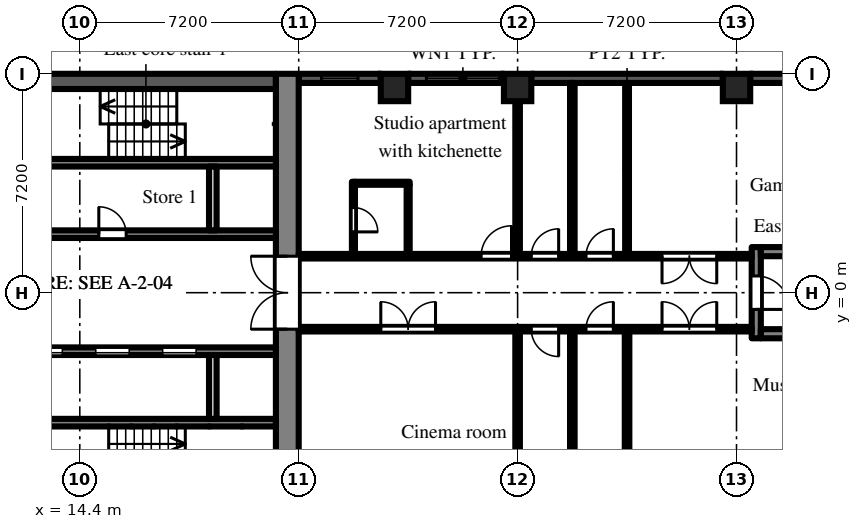
"""IFC4 building model, lengths in metres.
Left out: names, types, materials, properties, quantities, classifications, styles, units other than length and angle.
Written with IfcOpenShell. Run it as: python <this file> out.ifc"""

import sys

from ifc_helpers import new_model, si_unit, direction, frame, frame_2d, origin, origin_2d, place, context, subcontext, project, spatial, rectangle, extrude, element, fill, save


model = new_model("IFC4")
c1 = context("Model", 3, precision=1e-05, world=origin(), true_north=direction((0.0, 1.0)))
c2 = subcontext(c1, "Body", "Model", "MODEL_VIEW")
j1 = project(units=[si_unit("LENGTHUNIT", "METRE"), si_unit("PLANEANGLEUNIT", "RADIAN")], contexts=[c1])
p1 = place(None, origin())
s1 = spatial("IfcSite", under=j1, at=p1, CompositionType="ELEMENT")
p2 = place(p1, origin())
s2 = spatial("IfcBuilding", under=s1, at=p2, CompositionType="ELEMENT")
p3 = place(p2, frame((0.0, 0.0, 11.7)))
s3 = spatial("IfcBuildingStorey", under=s2, at=p3, CompositionType="ELEMENT", Elevation=11.7)
for number, where, z_axis, x_axis in (
    (1, (24.75, 6.75, 0.0), (0.0, 0.0, 1.0), (1.0, 0.0, 0.0)),
    (2, (28.8, 6.75, 0.0), (0.0, 0.0, 1.0), (1.0, 0.0, 0.0)),
    (3, (36.0, 6.75, 0.0), (0.0, 0.0, 1.0), (1.0, 0.0, 0.0)),
):
    element("IfcColumn", number, at=place(p3, frame(where, z_axis=z_axis, x_axis=x_axis)), inside=s3, PredefinedType="COLUMN", context=c2, shape_type="SweptSolid", body=[
        extrude(rectangle(XDim=0.9, YDim=0.9, at=origin_2d()), origin(), (0.0, 0.0, 1.0), 3.0),
    ])
p4 = place(p3, frame((38.7, 7.05, 0.0), z_axis=(0.0, 0.0, 1.0), x_axis=(-1.0, 0.0, 0.0)))
e4 = element("IfcWall", 4, at=p4, inside=s3, PredefinedType="SOLIDWALL", context=c2, shape_type="SweptSolid", body=[
    extrude(rectangle(XDim=2.25, YDim=0.3, at=frame_2d((1.125, 0.0))), origin(), (0.0, 0.0, 1.0), 2.1),
])
p5 = place(p3, frame((35.55, 7.05, 0.0), z_axis=(0.0, 0.0, 1.0), x_axis=(-1.0, 0.0, 0.0)))
e5 = element("IfcWall", 5, at=p5, inside=s3, PredefinedType="SOLIDWALL", context=c2, shape_type="SweptSolid", body=[
    extrude(rectangle(XDim=6.3, YDim=0.3, at=frame_2d((3.15, 0.0))), origin(), (0.0, 0.0, 1.0), 2.1),
])
p6 = place(p3, frame((28.35, 7.05, 0.0), z_axis=(0.0, 0.0, 1.0), x_axis=(-1.0, 0.0, 0.0)))
e6 = element("IfcWall", 6, at=p6, inside=s3, PredefinedType="SOLIDWALL", context=c2, shape_type="SweptSolid", body=[
    extrude(rectangle(XDim=3.15, YDim=0.3, at=frame_2d((1.575, 0.0))), origin(), (0.0, 0.0, 1.0), 2.1),
])
p7 = place(p6, frame((0.15, 0.0, 0.2)))
e7 = element("IfcOpeningElement", 7, at=p7, cuts=e6, PredefinedType="OPENING", context=c2, shape_type="SweptSolid", body=[
    extrude(rectangle(XDim=2.4, YDim=1.85, at=frame_2d((1.2, 0.925))), frame((0.0, 0.16, 0.0), z_axis=(0.0, -1.0, 0.0), x_axis=(1.0, 0.0, 0.0)), (0.0, 0.0, 1.0), 0.32),
])
p8 = place(p3, frame((24.3, 7.05, 0.0), z_axis=(0.0, 0.0, 1.0), x_axis=(-1.0, 0.0, 0.0)))
e8 = element("IfcWall", 8, at=p8, inside=s3, PredefinedType="SOLIDWALL", context=c2, shape_type="SweptSolid", body=[
    extrude(rectangle(XDim=2.7, YDim=0.3, at=frame_2d((1.35, 0.0))), origin(), (0.0, 0.0, 1.0), 2.1),
])
p9 = place(p8, frame((0.75, 0.0, 0.2)))
e9 = element("IfcOpeningElement", 9, at=p9, cuts=e8, PredefinedType="OPENING", context=c2, shape_type="SweptSolid", body=[
    extrude(rectangle(XDim=1.2, YDim=1.85, at=frame_2d((0.6, 0.925))), frame((0.0, 0.16, 0.0), z_axis=(0.0, -1.0, 0.0), x_axis=(1.0, 0.0, 0.0)), (0.0, 0.0, 1.0), 0.32),
])
p10 = place(p3, frame((21.225, -7.2, 0.0), z_axis=(0.0, 0.0, 1.0), x_axis=(0.0, 1.0, 0.0)))
e10 = element("IfcWall", 10, at=p10, inside=s3, PredefinedType="SHEAR", context=c2, shape_type="SweptSolid", body=[
    extrude(rectangle(XDim=14.4, YDim=0.75, at=frame_2d((7.2, 0.0))), origin(), (0.0, 0.0, 1.0), 2.575),
])
p11 = place(p10, frame((6.0, 0.0, 0.0)))
e11 = element("IfcOpeningElement", 11, at=p11, cuts=e10, PredefinedType="OPENING", context=c2, shape_type="SweptSolid", body=[
    extrude(rectangle(XDim=2.4, YDim=2.2, at=frame_2d((1.2, 1.1))), frame((0.0, 0.385, 0.0), z_axis=(0.0, -1.0, 0.0), x_axis=(1.0, 0.0, 0.0)), (0.0, 0.0, 1.0), 0.77),
])
p12 = place(p3, frame((7.9, 6.95, 0.0), z_axis=(0.0, 0.0, 1.0), x_axis=(1.0, 0.0, 0.0)))
e12 = element("IfcWall", 12, at=p12, inside=s3, PredefinedType="SHEAR", context=c2, shape_type="SweptSolid", body=[
    extrude(rectangle(XDim=12.95, YDim=0.5, at=frame_2d((6.475, 0.0))), origin(), (0.0, 0.0, 1.0), 2.575),
])
p13 = place(p3, frame((7.9, 1.925, 0.0), z_axis=(0.0, 0.0, 1.0), x_axis=(1.0, 0.0, 0.0)))
e13 = element("IfcWall", 13, at=p13, inside=s3, PredefinedType="SHEAR", context=c2, shape_type="SweptSolid", body=[
    extrude(rectangle(XDim=12.95, YDim=0.25, at=frame_2d((6.475, 0.0))), origin(), (0.0, 0.0, 1.0), 2.575),
])
p14 = place(p13, frame((0.525, 0.0, 0.0)))
e14 = element("IfcOpeningElement", 14, at=p14, cuts=e13, PredefinedType="OPENING", context=c2, shape_type="SweptSolid", body=[
    extrude(rectangle(XDim=0.9, YDim=2.1, at=frame_2d((0.45, 1.05))), frame((0.0, 0.135, 0.0), z_axis=(0.0, -1.0, 0.0), x_axis=(1.0, 0.0, 0.0)), (0.0, 0.0, 1.0), 0.27),
])
p15 = place(p13, frame((2.625, 0.0, 0.0)))
e15 = element("IfcOpeningElement", 15, at=p15, cuts=e13, PredefinedType="OPENING", context=c2, shape_type="SweptSolid", body=[
    extrude(rectangle(XDim=1.1, YDim=2.1, at=frame_2d((0.55, 1.05))), frame((0.0, 0.135, 0.0), z_axis=(0.0, -1.0, 0.0), x_axis=(1.0, 0.0, 0.0)), (0.0, 0.0, 1.0), 0.27),
])
p16 = place(p13, frame((7.125, 0.0, 0.0)))
e16 = element("IfcOpeningElement", 16, at=p16, cuts=e13, PredefinedType="OPENING", context=c2, shape_type="SweptSolid", body=[
    extrude(rectangle(XDim=0.9, YDim=2.1, at=frame_2d((0.45, 1.05))), frame((0.0, 0.135, 0.0), z_axis=(0.0, -1.0, 0.0), x_axis=(1.0, 0.0, 0.0)), (0.0, 0.0, 1.0), 0.27),
])
p17 = place(p3, frame((12.3, 4.275, 0.0), z_axis=(0.0, 0.0, 1.0), x_axis=(1.0, 0.0, 0.0)))
e17 = element("IfcWall", 17, at=p17, inside=s3, PredefinedType="SHEAR", context=c2, shape_type="SweptSolid", body=[
    extrude(rectangle(XDim=8.55, YDim=0.25, at=frame_2d((4.275, 0.0))), origin(), (0.0, 0.0, 1.0), 2.575),
])
p18 = place(p3, frame((18.775, 2.05, 0.0), z_axis=(0.0, 0.0, 1.0), x_axis=(0.0, 1.0, 0.0)))
e18 = element("IfcWall", 18, at=p18, inside=s3, PredefinedType="PARTITIONING", context=c2, shape_type="SweptSolid", body=[
    extrude(rectangle(XDim=2.1, YDim=0.25, at=frame_2d((1.05, 0.0))), origin(), (0.0, 0.0, 1.0), 2.575),
])
p19 = place(p3, frame((7.9, -1.925, 0.0), z_axis=(0.0, 0.0, 1.0), x_axis=(1.0, 0.0, 0.0)))
e19 = element("IfcWall", 19, at=p19, inside=s3, PredefinedType="SHEAR", context=c2, shape_type="SweptSolid", body=[
    extrude(rectangle(XDim=12.95, YDim=0.25, at=frame_2d((6.475, 0.0))), origin(), (0.0, 0.0, 1.0), 2.575),
])
p20 = place(p19, frame((4.825, 0.0, 0.0)))
e20 = element("IfcOpeningElement", 20, at=p20, cuts=e19, PredefinedType="OPENING", context=c2, shape_type="SweptSolid", body=[
    extrude(rectangle(XDim=1.1, YDim=2.1, at=frame_2d((0.55, 1.05))), frame((0.0, 0.135, 0.0), z_axis=(0.0, -1.0, 0.0), x_axis=(1.0, 0.0, 0.0)), (0.0, 0.0, 1.0), 0.27),
])
p21 = place(p19, frame((7.025, 0.0, 0.0)))
e21 = element("IfcOpeningElement", 21, at=p21, cuts=e19, PredefinedType="OPENING", context=c2, shape_type="SweptSolid", body=[
    extrude(rectangle(XDim=1.1, YDim=2.1, at=frame_2d((0.55, 1.05))), frame((0.0, 0.135, 0.0), z_axis=(0.0, -1.0, 0.0), x_axis=(1.0, 0.0, 0.0)), (0.0, 0.0, 1.0), 0.27),
])
p22 = place(p19, frame((9.225, 0.0, 0.0)))
e22 = element("IfcOpeningElement", 22, at=p22, cuts=e19, PredefinedType="OPENING", context=c2, shape_type="SweptSolid", body=[
    extrude(rectangle(XDim=1.1, YDim=2.1, at=frame_2d((0.55, 1.05))), frame((0.0, 0.135, 0.0), z_axis=(0.0, -1.0, 0.0), x_axis=(1.0, 0.0, 0.0)), (0.0, 0.0, 1.0), 0.27),
])
p23 = place(p19, frame((0.525, 0.0, 0.0)))
e23 = element("IfcOpeningElement", 23, at=p23, cuts=e19, PredefinedType="OPENING", context=c2, shape_type="SweptSolid", body=[
    extrude(rectangle(XDim=0.9, YDim=2.1, at=frame_2d((0.45, 1.05))), frame((0.0, 0.135, 0.0), z_axis=(0.0, -1.0, 0.0), x_axis=(1.0, 0.0, 0.0)), (0.0, 0.0, 1.0), 0.27),
])
p24 = place(p19, frame((2.625, 0.0, 0.0)))
e24 = element("IfcOpeningElement", 24, at=p24, cuts=e19, PredefinedType="OPENING", context=c2, shape_type="SweptSolid", body=[
    extrude(rectangle(XDim=1.1, YDim=2.1, at=frame_2d((0.55, 1.05))), frame((0.0, 0.135, 0.0), z_axis=(0.0, -1.0, 0.0), x_axis=(1.0, 0.0, 0.0)), (0.0, 0.0, 1.0), 0.27),
])
p25 = place(p3, frame((12.3, -4.275, 0.0), z_axis=(0.0, 0.0, 1.0), x_axis=(1.0, 0.0, 0.0)))
e25 = element("IfcWall", 25, at=p25, inside=s3, PredefinedType="SHEAR", context=c2, shape_type="SweptSolid", body=[
    extrude(rectangle(XDim=8.55, YDim=0.25, at=frame_2d((4.275, 0.0))), origin(), (0.0, 0.0, 1.0), 2.575),
])
p26 = place(p3, frame((18.775, -2.05, 0.0), z_axis=(0.0, 0.0, 1.0), x_axis=(0.0, -1.0, 0.0)))
e26 = element("IfcWall", 26, at=p26, inside=s3, PredefinedType="PARTITIONING", context=c2, shape_type="SweptSolid", body=[
    extrude(rectangle(XDim=2.1, YDim=0.25, at=frame_2d((1.05, 0.0))), origin(), (0.0, 0.0, 1.0), 2.575),
])
p27 = place(p3, frame((36.65, -1.5, 0.0), z_axis=(0.0, 0.0, 1.0), x_axis=(0.0, 1.0, 0.0)))
e27 = element("IfcWall", 27, at=p27, inside=s3, PredefinedType="SHEAR", context=c2, shape_type="SweptSolid", body=[
    extrude(rectangle(XDim=3.0, YDim=0.3, at=frame_2d((1.5, 0.0))), origin(), (0.0, 0.0, 1.0), 2.575),
])
p28 = place(p27, frame((0.95, 0.0, 0.0)))
e28 = element("IfcOpeningElement", 28, at=p28, cuts=e27, PredefinedType="OPENING", context=c2, shape_type="SweptSolid", body=[
    extrude(rectangle(XDim=1.1, YDim=2.1, at=frame_2d((0.55, 1.05))), frame((0.0, 0.16, 0.0), z_axis=(0.0, -1.0, 0.0), x_axis=(1.0, 0.0, 0.0)), (0.0, 0.0, 1.0), 0.32),
])
for number, where, z_axis, x_axis in (
    (29, (36.8, -1.35, 0.0), (0.0, 0.0, 1.0), (1.0, 0.0, 0.0)),
    (30, (36.8, 1.35, 0.0), (0.0, 0.0, 1.0), (1.0, 0.0, 0.0)),
):
    element("IfcWall", number, at=place(p3, frame(where, z_axis=z_axis, x_axis=x_axis)), inside=s3, PredefinedType="SHEAR", context=c2, shape_type="SweptSolid", body=[
        extrude(rectangle(XDim=5.8, YDim=0.3, at=frame_2d((2.9, 0.0))), origin(), (0.0, 0.0, 1.0), 2.575),
    ])
p29 = place(p3, frame((21.6, -1.2, 0.0), z_axis=(0.0, 0.0, 1.0), x_axis=(1.0, 0.0, 0.0)))
e31 = element("IfcWall", 31, at=p29, inside=s3, PredefinedType="PARTITIONING", context=c2, shape_type="SweptSolid", body=[
    extrude(rectangle(XDim=14.9, YDim=0.15, at=frame_2d((7.45, 0.0))), origin(), (0.0, 0.0, 1.0), 2.575),
])
p30 = place(p29, frame((2.7, 0.0, 0.0)))
e32 = element("IfcOpeningElement", 32, at=p30, cuts=e31, PredefinedType="OPENING", context=c2, shape_type="SweptSolid", body=[
    extrude(rectangle(XDim=1.8, YDim=2.1, at=frame_2d((0.9, 1.05))), frame((0.0, 0.085, 0.0), z_axis=(0.0, -1.0, 0.0), x_axis=(1.0, 0.0, 0.0)), (0.0, 0.0, 1.0), 0.17),
])
p31 = place(p29, frame((7.65, 0.0, 0.0)))
e33 = element("IfcOpeningElement", 33, at=p31, cuts=e31, PredefinedType="OPENING", context=c2, shape_type="SweptSolid", body=[
    extrude(rectangle(XDim=0.9, YDim=2.1, at=frame_2d((0.45, 1.05))), frame((0.0, 0.085, 0.0), z_axis=(0.0, -1.0, 0.0), x_axis=(1.0, 0.0, 0.0)), (0.0, 0.0, 1.0), 0.17),
])
p32 = place(p29, frame((9.45, 0.0, 0.0)))
e34 = element("IfcOpeningElement", 34, at=p32, cuts=e31, PredefinedType="OPENING", context=c2, shape_type="SweptSolid", body=[
    extrude(rectangle(XDim=0.9, YDim=2.1, at=frame_2d((0.45, 1.05))), frame((0.0, 0.085, 0.0), z_axis=(0.0, -1.0, 0.0), x_axis=(1.0, 0.0, 0.0)), (0.0, 0.0, 1.0), 0.17),
])
p33 = place(p29, frame((11.95, 0.0, 0.0)))
e35 = element("IfcOpeningElement", 35, at=p33, cuts=e31, PredefinedType="OPENING", context=c2, shape_type="SweptSolid", body=[
    extrude(rectangle(XDim=1.8, YDim=2.1, at=frame_2d((0.9, 1.05))), frame((0.0, 0.085, 0.0), z_axis=(0.0, -1.0, 0.0), x_axis=(1.0, 0.0, 0.0)), (0.0, 0.0, 1.0), 0.17),
])
p34 = place(p3, frame((21.6, 1.2, 0.0), z_axis=(0.0, 0.0, 1.0), x_axis=(1.0, 0.0, 0.0)))
e36 = element("IfcWall", 36, at=p34, inside=s3, PredefinedType="PARTITIONING", context=c2, shape_type="SweptSolid", body=[
    extrude(rectangle(XDim=14.9, YDim=0.15, at=frame_2d((7.45, 0.0))), origin(), (0.0, 0.0, 1.0), 2.575),
])
p35 = place(p34, frame((6.0, 0.0, 0.0)))
e37 = element("IfcOpeningElement", 37, at=p35, cuts=e36, PredefinedType="OPENING", context=c2, shape_type="SweptSolid", body=[
    extrude(rectangle(XDim=1.0, YDim=2.1, at=frame_2d((0.5, 1.05))), frame((0.0, 0.085, 0.0), z_axis=(0.0, -1.0, 0.0), x_axis=(1.0, 0.0, 0.0)), (0.0, 0.0, 1.0), 0.17),
])
p36 = place(p34, frame((7.65, 0.0, 0.0)))
e38 = element("IfcOpeningElement", 38, at=p36, cuts=e36, PredefinedType="OPENING", context=c2, shape_type="SweptSolid", body=[
    extrude(rectangle(XDim=0.9, YDim=2.1, at=frame_2d((0.45, 1.05))), frame((0.0, 0.085, 0.0), z_axis=(0.0, -1.0, 0.0), x_axis=(1.0, 0.0, 0.0)), (0.0, 0.0, 1.0), 0.17),
])
p37 = place(p34, frame((9.45, 0.0, 0.0)))
e39 = element("IfcOpeningElement", 39, at=p37, cuts=e36, PredefinedType="OPENING", context=c2, shape_type="SweptSolid", body=[
    extrude(rectangle(XDim=0.9, YDim=2.1, at=frame_2d((0.45, 1.05))), frame((0.0, 0.085, 0.0), z_axis=(0.0, -1.0, 0.0), x_axis=(1.0, 0.0, 0.0)), (0.0, 0.0, 1.0), 0.17),
])
p38 = place(p34, frame((11.95, 0.0, 0.0)))
e40 = element("IfcOpeningElement", 40, at=p38, cuts=e36, PredefinedType="OPENING", context=c2, shape_type="SweptSolid", body=[
    extrude(rectangle(XDim=1.8, YDim=2.1, at=frame_2d((0.9, 1.05))), frame((0.0, 0.085, 0.0), z_axis=(0.0, -1.0, 0.0), x_axis=(1.0, 0.0, 0.0)), (0.0, 0.0, 1.0), 0.17),
])
p39 = place(p3, frame((23.4, 1.275, 0.0), z_axis=(0.0, 0.0, 1.0), x_axis=(0.0, 1.0, 0.0)))
e41 = element("IfcWall", 41, at=p39, inside=s3, PredefinedType="PARTITIONING", context=c2, shape_type="SweptSolid", body=[
    extrude(rectangle(XDim=2.375, YDim=0.1, at=frame_2d((1.188, 0.0))), origin(), (0.0, 0.0, 1.0), 2.575),
])
p40 = place(p39, frame((0.725, 0.0, 0.0)))
e42 = element("IfcOpeningElement", 42, at=p40, cuts=e41, PredefinedType="OPENING", context=c2, shape_type="SweptSolid", body=[
    extrude(rectangle(XDim=0.8, YDim=2.1, at=frame_2d((0.4, 1.05))), frame((0.0, 0.06, 0.0), z_axis=(0.0, -1.0, 0.0), x_axis=(1.0, 0.0, 0.0)), (0.0, 0.0, 1.0), 0.12),
])
p41 = place(p3, frame((23.45, 3.6, 0.0), z_axis=(0.0, 0.0, 1.0), x_axis=(1.0, 0.0, 0.0)))
e43 = element("IfcWall", 43, at=p41, inside=s3, PredefinedType="PARTITIONING", context=c2, shape_type="SweptSolid", body=[
    extrude(rectangle(XDim=1.8, YDim=0.1, at=frame_2d((0.9, 0.0))), origin(), (0.0, 0.0, 1.0), 2.575),
])
p42 = place(p3, frame((25.2, 1.275, 0.0), z_axis=(0.0, 0.0, 1.0), x_axis=(0.0, 1.0, 0.0)))
e44 = element("IfcWall", 44, at=p42, inside=s3, PredefinedType="PARTITIONING", context=c2, shape_type="SweptSolid", body=[
    extrude(rectangle(XDim=2.275, YDim=0.1, at=frame_2d((1.138, 0.0))), origin(), (0.0, 0.0, 1.0), 2.575),
])
for number, where, z_axis, x_axis in (
    (45, (28.8, -6.9, 0.0), (0.0, 0.0, 1.0), (0.0, 1.0, 0.0)),
    (46, (28.8, 1.275, 0.0), (0.0, 0.0, 1.0), (0.0, 1.0, 0.0)),
    (47, (30.6, -6.9, 0.0), (0.0, 0.0, 1.0), (0.0, 1.0, 0.0)),
    (48, (30.6, 1.275, 0.0), (0.0, 0.0, 1.0), (0.0, 1.0, 0.0)),
    (49, (32.4, -6.9, 0.0), (0.0, 0.0, 1.0), (0.0, 1.0, 0.0)),
):
    element("IfcWall", number, at=place(p3, frame(where, z_axis=z_axis, x_axis=x_axis)), inside=s3, PredefinedType="PARTITIONING", context=c2, shape_type="SweptSolid", body=[
        extrude(rectangle(XDim=5.625, YDim=0.15, at=frame_2d((2.812, 0.0))), origin(), (0.0, 0.0, 1.0), 2.575),
    ])
p43 = place(p3, frame((32.4, 1.275, 0.0), z_axis=(0.0, 0.0, 1.0), x_axis=(0.0, 1.0, 0.0)))
e50 = element("IfcWall", 50, at=p43, inside=s3, PredefinedType="PARTITIONING", context=c2, shape_type="SweptSolid", body=[
    extrude(rectangle(XDim=5.625, YDim=0.125, at=frame_2d((2.812, 0.0))), origin(), (0.0, 0.0, 1.0), 2.575),
])
p44 = place(p7, origin())
e51 = element("IfcWindow", 51, at=p44, inside=s3, PartitioningType="SINGLE_PANEL", PredefinedType="WINDOW", context=c2, shape_type="SweptSolid", body=[
    extrude(rectangle(XDim=2.4, YDim=1.85, at=frame_2d((1.2, 0.925))), frame((0.0, 0.03, 0.0), z_axis=(0.0, -1.0, 0.0), x_axis=(1.0, 0.0, 0.0)), (0.0, 0.0, 1.0), 0.06),
])
fill(e7, e51)
p45 = place(p9, origin())
e52 = element("IfcWindow", 52, at=p45, inside=s3, PartitioningType="SINGLE_PANEL", PredefinedType="WINDOW", context=c2, shape_type="SweptSolid", body=[
    extrude(rectangle(XDim=1.2, YDim=1.85, at=frame_2d((0.6, 0.925))), frame((0.0, 0.03, 0.0), z_axis=(0.0, -1.0, 0.0), x_axis=(1.0, 0.0, 0.0)), (0.0, 0.0, 1.0), 0.06),
])
fill(e9, e52)
p46 = place(p20, origin())
e53 = element("IfcDoor", 53, at=p46, inside=s3, OperationType="SLIDING_TO_LEFT", PredefinedType="DOOR", context=c2, shape_type="SweptSolid", body=[
    extrude(rectangle(XDim=1.1, YDim=2.1, at=frame_2d((0.55, 1.05))), frame((0.0, 0.025, 0.0), z_axis=(0.0, -1.0, 0.0), x_axis=(1.0, 0.0, 0.0)), (0.0, 0.0, 1.0), 0.05),
])
fill(e20, e53)
p47 = place(p21, origin())
e54 = element("IfcDoor", 54, at=p47, inside=s3, OperationType="SLIDING_TO_LEFT", PredefinedType="DOOR", context=c2, shape_type="SweptSolid", body=[
    extrude(rectangle(XDim=1.1, YDim=2.1, at=frame_2d((0.55, 1.05))), frame((0.0, 0.025, 0.0), z_axis=(0.0, -1.0, 0.0), x_axis=(1.0, 0.0, 0.0)), (0.0, 0.0, 1.0), 0.05),
])
fill(e21, e54)
p48 = place(p22, origin())
e55 = element("IfcDoor", 55, at=p48, inside=s3, OperationType="SLIDING_TO_LEFT", PredefinedType="DOOR", context=c2, shape_type="SweptSolid", body=[
    extrude(rectangle(XDim=1.1, YDim=2.1, at=frame_2d((0.55, 1.05))), frame((0.0, 0.025, 0.0), z_axis=(0.0, -1.0, 0.0), x_axis=(1.0, 0.0, 0.0)), (0.0, 0.0, 1.0), 0.05),
])
fill(e22, e55)
p49 = place(p11, origin())
e56 = element("IfcDoor", 56, at=p49, inside=s3, OperationType="DOUBLE_DOOR_DOUBLE_SWING", PredefinedType="DOOR", context=c2, shape_type="SweptSolid", body=[
    extrude(rectangle(XDim=2.4, YDim=2.2, at=frame_2d((1.2, 1.1))), frame((0.0, 0.025, 0.0), z_axis=(0.0, -1.0, 0.0), x_axis=(1.0, 0.0, 0.0)), (0.0, 0.0, 1.0), 0.05),
])
fill(e11, e56)
p50 = place(p16, origin())
e57 = element("IfcDoor", 57, at=p50, inside=s3, OperationType="SINGLE_SWING_LEFT", PredefinedType="DOOR", context=c2, shape_type="SweptSolid", body=[
    extrude(rectangle(XDim=0.9, YDim=2.1, at=frame_2d((0.45, 1.05))), frame((0.0, 0.025, 0.0), z_axis=(0.0, -1.0, 0.0), x_axis=(1.0, 0.0, 0.0)), (0.0, 0.0, 1.0), 0.05),
])
fill(e16, e57)
p51 = place(p28, frame((1.1, 0.0, 0.0), z_axis=(0.0, 0.0, 1.0), x_axis=(-1.0, 0.0, 0.0)))
e58 = element("IfcDoor", 58, at=p51, inside=s3, OperationType="SINGLE_SWING_RIGHT", PredefinedType="DOOR", context=c2, shape_type="SweptSolid", body=[
    extrude(rectangle(XDim=1.1, YDim=2.1, at=frame_2d((0.55, 1.05))), frame((0.0, 0.025, 0.0), z_axis=(0.0, -1.0, 0.0), x_axis=(1.0, 0.0, 0.0)), (0.0, 0.0, 1.0), 0.05),
])
fill(e28, e58)
p52 = place(p40, frame((0.8, 0.0, 0.0), z_axis=(0.0, 0.0, 1.0), x_axis=(-1.0, 0.0, 0.0)))
e59 = element("IfcDoor", 59, at=p52, inside=s3, OperationType="SINGLE_SWING_RIGHT", PredefinedType="DOOR", context=c2, shape_type="SweptSolid", body=[
    extrude(rectangle(XDim=0.8, YDim=2.1, at=frame_2d((0.4, 1.05))), frame((0.0, 0.025, 0.0), z_axis=(0.0, -1.0, 0.0), x_axis=(1.0, 0.0, 0.0)), (0.0, 0.0, 1.0), 0.05),
])
fill(e42, e59)
p53 = place(p35, origin())
e60 = element("IfcDoor", 60, at=p53, inside=s3, OperationType="SINGLE_SWING_RIGHT", PredefinedType="DOOR", context=c2, shape_type="SweptSolid", body=[
    extrude(rectangle(XDim=1.0, YDim=2.1, at=frame_2d((0.5, 1.05))), frame((0.0, 0.025, 0.0), z_axis=(0.0, -1.0, 0.0), x_axis=(1.0, 0.0, 0.0)), (0.0, 0.0, 1.0), 0.05),
])
fill(e37, e60)
p54 = place(p36, origin())
e61 = element("IfcDoor", 61, at=p54, inside=s3, OperationType="SINGLE_SWING_RIGHT", PredefinedType="DOOR", context=c2, shape_type="SweptSolid", body=[
    extrude(rectangle(XDim=0.9, YDim=2.1, at=frame_2d((0.45, 1.05))), frame((0.0, 0.025, 0.0), z_axis=(0.0, -1.0, 0.0), x_axis=(1.0, 0.0, 0.0)), (0.0, 0.0, 1.0), 0.05),
])
fill(e38, e61)
p55 = place(p37, origin())
e62 = element("IfcDoor", 62, at=p55, inside=s3, OperationType="SINGLE_SWING_RIGHT", PredefinedType="DOOR", context=c2, shape_type="SweptSolid", body=[
    extrude(rectangle(XDim=0.9, YDim=2.1, at=frame_2d((0.45, 1.05))), frame((0.0, 0.025, 0.0), z_axis=(0.0, -1.0, 0.0), x_axis=(1.0, 0.0, 0.0)), (0.0, 0.0, 1.0), 0.05),
])
fill(e39, e62)
p56 = place(p38, frame((1.8, 0.0, 0.0), z_axis=(0.0, 0.0, 1.0), x_axis=(-1.0, 0.0, 0.0)))
e63 = element("IfcDoor", 63, at=p56, inside=s3, OperationType="DOUBLE_DOOR_DOUBLE_SWING", PredefinedType="DOOR", context=c2, shape_type="SweptSolid", body=[
    extrude(rectangle(XDim=1.8, YDim=2.1, at=frame_2d((0.9, 1.05))), frame((0.0, 0.025, 0.0), z_axis=(0.0, -1.0, 0.0), x_axis=(1.0, 0.0, 0.0)), (0.0, 0.0, 1.0), 0.05),
])
fill(e40, e63)
p57 = place(p30, origin())
e64 = element("IfcDoor", 64, at=p57, inside=s3, OperationType="DOUBLE_DOOR_DOUBLE_SWING", PredefinedType="DOOR", context=c2, shape_type="SweptSolid", body=[
    extrude(rectangle(XDim=1.8, YDim=2.1, at=frame_2d((0.9, 1.05))), frame((0.0, 0.025, 0.0), z_axis=(0.0, -1.0, 0.0), x_axis=(1.0, 0.0, 0.0)), (0.0, 0.0, 1.0), 0.05),
])
fill(e32, e64)
p58 = place(p31, frame((0.9, 0.0, 0.0), z_axis=(0.0, 0.0, 1.0), x_axis=(-1.0, 0.0, 0.0)))
e65 = element("IfcDoor", 65, at=p58, inside=s3, OperationType="SINGLE_SWING_LEFT", PredefinedType="DOOR", context=c2, shape_type="SweptSolid", body=[
    extrude(rectangle(XDim=0.9, YDim=2.1, at=frame_2d((0.45, 1.05))), frame((0.0, 0.025, 0.0), z_axis=(0.0, -1.0, 0.0), x_axis=(1.0, 0.0, 0.0)), (0.0, 0.0, 1.0), 0.05),
])
fill(e33, e65)
p59 = place(p32, origin())
e66 = element("IfcDoor", 66, at=p59, inside=s3, OperationType="SINGLE_SWING_RIGHT", PredefinedType="DOOR", context=c2, shape_type="SweptSolid", body=[
    extrude(rectangle(XDim=0.9, YDim=2.1, at=frame_2d((0.45, 1.05))), frame((0.0, 0.025, 0.0), z_axis=(0.0, -1.0, 0.0), x_axis=(1.0, 0.0, 0.0)), (0.0, 0.0, 1.0), 0.05),
])
fill(e34, e66)
p60 = place(p33, origin())
e67 = element("IfcDoor", 67, at=p60, inside=s3, OperationType="DOUBLE_DOOR_DOUBLE_SWING", PredefinedType="DOOR", context=c2, shape_type="SweptSolid", body=[
    extrude(rectangle(XDim=1.8, YDim=2.1, at=frame_2d((0.9, 1.05))), frame((0.0, 0.025, 0.0), z_axis=(0.0, -1.0, 0.0), x_axis=(1.0, 0.0, 0.0)), (0.0, 0.0, 1.0), 0.05),
])
fill(e35, e67)
save(model, sys.argv[1])
